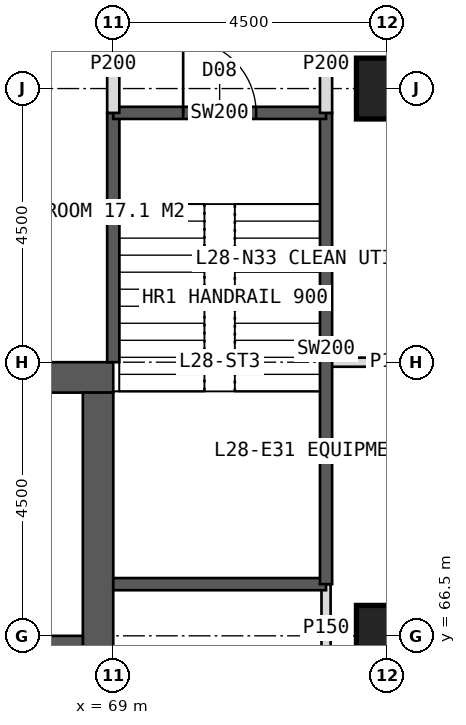
"""IFC4 building model, lengths in metres.
Left out: names, types, materials, properties, quantities, classifications, styles, units other than length and angle.
Written with IfcOpenShell. Run it as: python <this file> out.ifc"""

import sys

from ifc_helpers import new_model, si_unit, direction, frame, frame_2d, origin, origin_2d, place, context, subcontext, project, spatial, rectangle, hollow_rectangle, extrude, element, fill, save


model = new_model("IFC4")
c1 = context("Model", 3, precision=1e-05, world=origin(), true_north=direction((0.0, 1.0)))
c2 = subcontext(c1, "Body", "Model", "MODEL_VIEW")
j1 = project(units=[si_unit("LENGTHUNIT", "METRE"), si_unit("PLANEANGLEUNIT", "RADIAN")], contexts=[c1])
p1 = place(None, origin())
s1 = spatial("IfcSite", under=j1, at=p1, CompositionType="ELEMENT")
p2 = place(p1, origin())
s2 = spatial("IfcBuilding", under=s1, at=p2, CompositionType="ELEMENT")
p3 = place(p2, frame((0.0, 0.0, 120.0)))
s3 = spatial("IfcBuildingStorey", under=s2, at=p3, CompositionType="ELEMENT", Elevation=120.0)
p4 = place(p3, frame((51.0, 70.75, 0.0), z_axis=(0.0, 0.0, 1.0), x_axis=(1.0, 0.0, 0.0)))
e1 = element("IfcWall", 1, at=p4, inside=s3, PredefinedType="SHEAR", context=c2, shape_type="SweptSolid", body=[
    extrude(rectangle(XDim=18.0, YDim=0.5, at=frame_2d((9.0, 0.0))), origin(), (0.0, 0.0, 1.0), 4.0),
])
p5 = place(p4, frame((8.1, 0.0, 0.0)))
e2 = element("IfcOpeningElement", 2, at=p5, cuts=e1, PredefinedType="OPENING", context=c2, shape_type="SweptSolid", body=[
    extrude(rectangle(XDim=1.8, YDim=2.2, at=frame_2d((0.9, 1.1))), frame((0.0, 0.26, 0.0), z_axis=(0.0, -1.0, 0.0), x_axis=(1.0, 0.0, 0.0)), (0.0, 0.0, 1.0), 0.52),
])
p6 = place(p3, frame((68.75, 53.5, 0.0), z_axis=(0.0, 0.0, 1.0), x_axis=(0.0, 1.0, 0.0)))
e3 = element("IfcWall", 3, at=p6, inside=s3, PredefinedType="SHEAR", context=c2, shape_type="SweptSolid", body=[
    extrude(rectangle(XDim=17.0, YDim=0.5, at=frame_2d((8.5, 0.0))), origin(), (0.0, 0.0, 1.0), 4.0),
])
p7 = place(p6, frame((9.5, 0.0, 0.0)))
e4 = element("IfcOpeningElement", 4, at=p7, cuts=e3, PredefinedType="OPENING", context=c2, shape_type="SweptSolid", body=[
    extrude(rectangle(XDim=1.5, YDim=2.2, at=frame_2d((0.75, 1.1))), frame((0.0, 0.26, 0.0), z_axis=(0.0, -1.0, 0.0), x_axis=(1.0, 0.0, 0.0)), (0.0, 0.0, 1.0), 0.52),
])
p8 = place(p3, frame((65.2, 66.35, 0.0), z_axis=(0.0, 0.0, 1.0), x_axis=(1.0, 0.0, 0.0)))
e5 = element("IfcWall", 5, at=p8, inside=s3, PredefinedType="SHEAR", context=c2, shape_type="SweptSolid", body=[
    extrude(rectangle(XDim=3.3, YDim=0.3, at=frame_2d((1.65, 0.0))), origin(), (0.0, 0.0, 1.0), 4.0),
])
p9 = place(p8, frame((1.05, 0.0, 0.0)))
e6 = element("IfcOpeningElement", 6, at=p9, cuts=e5, PredefinedType="OPENING", context=c2, shape_type="SweptSolid", body=[
    extrude(rectangle(XDim=1.2, YDim=2.2, at=frame_2d((0.6, 1.1))), frame((0.0, 0.16, 0.0), z_axis=(0.0, -1.0, 0.0), x_axis=(1.0, 0.0, 0.0)), (0.0, 0.0, 1.0), 0.32),
])
for number, where, z_axis, x_axis in (
    (7, (73.5, 75.5, 0.0), (0.0, 0.0, 1.0), (1.0, 0.0, 0.0)),
    (8, (73.5, 66.5, 0.0), (0.0, 0.0, 1.0), (1.0, 0.0, 0.0)),
):
    element("IfcColumn", number, at=place(p3, frame(where, z_axis=z_axis, x_axis=x_axis)), inside=s3, PredefinedType="COLUMN", context=c2, shape_type="SweptSolid", body=[
        extrude(hollow_rectangle(XDim=1.0, YDim=1.0, WallThickness=0.1, at=origin_2d()), origin(), (0.0, 0.0, 1.0), 4.0),
    ])
p10 = place(p3, frame((72.5, 71.0, 0.0), z_axis=(0.0, 0.0, 1.0), x_axis=(1.0, 0.0, 0.0)))
e9 = element("IfcWall", 9, at=p10, inside=s3, PredefinedType="PARTITIONING", context=c2, shape_type="SweptSolid", body=[
    extrude(rectangle(XDim=2.2, YDim=0.15, at=frame_2d((1.1, 0.0))), origin(), (0.0, 0.0, 1.0), 3.75),
])
p11 = place(p3, frame((72.5, 65.9, 0.0), z_axis=(0.0, 0.0, 1.0), x_axis=(0.0, 1.0, 0.0)))
e10 = element("IfcWall", 10, at=p11, inside=s3, PredefinedType="PARTITIONING", context=c2, shape_type="SweptSolid", body=[
    extrude(rectangle(XDim=1.45, YDim=0.15, at=frame_2d((0.725, 0.0))), origin(), (0.0, 0.0, 1.0), 3.75),
])
p12 = place(p3, frame((69.0, 71.0, 0.0), z_axis=(0.0, 0.0, 1.0), x_axis=(0.0, 1.0, 0.0)))
e11 = element("IfcWall", 11, at=p12, inside=s3, PredefinedType="SOLIDWALL", context=c2, shape_type="SweptSolid", body=[
    extrude(rectangle(XDim=4.1, YDim=0.2, at=frame_2d((2.05, 0.0))), origin(), (0.0, 0.0, 1.0), 3.75),
])
p13 = place(p3, frame((69.0, 67.35, 0.0), z_axis=(0.0, 0.0, 1.0), x_axis=(1.0, 0.0, 0.0)))
e12 = element("IfcWall", 12, at=p13, inside=s3, PredefinedType="SOLIDWALL", context=c2, shape_type="SweptSolid", body=[
    extrude(rectangle(XDim=3.5, YDim=0.2, at=frame_2d((1.75, 0.0))), origin(), (0.0, 0.0, 1.0), 3.75),
])
p14 = place(p3, frame((72.5, 67.35, 0.0), z_axis=(0.0, 0.0, 1.0), x_axis=(0.0, 1.0, 0.0)))
e13 = element("IfcWall", 13, at=p14, inside=s3, PredefinedType="SOLIDWALL", context=c2, shape_type="SweptSolid", body=[
    extrude(rectangle(XDim=7.75, YDim=0.2, at=frame_2d((3.875, 0.0))), origin(), (0.0, 0.0, 1.0), 3.75),
])
p15 = place(p3, frame((69.0, 75.1, 0.0), z_axis=(0.0, 0.0, 1.0), x_axis=(1.0, 0.0, 0.0)))
e14 = element("IfcWall", 14, at=p15, inside=s3, PredefinedType="SOLIDWALL", context=c2, shape_type="SweptSolid", body=[
    extrude(rectangle(XDim=3.5, YDim=0.2, at=frame_2d((1.75, 0.0))), origin(), (0.0, 0.0, 1.0), 3.75),
])
p16 = place(p15, frame((1.15, 0.0, 0.0)))
e15 = element("IfcOpeningElement", 15, at=p16, cuts=e14, PredefinedType="OPENING", context=c2, shape_type="SweptSolid", body=[
    extrude(rectangle(XDim=1.2, YDim=2.1, at=frame_2d((0.6, 1.05))), frame((0.0, 0.11, 0.0), z_axis=(0.0, -1.0, 0.0), x_axis=(1.0, 0.0, 0.0)), (0.0, 0.0, 1.0), 0.22),
])
for number, where, z_axis, x_axis in (
    (16, (69.0, 75.1, 0.0), (0.0, 0.0, 1.0), (0.0, 1.0, 0.0)),
    (17, (72.5, 75.1, 0.0), (0.0, 0.0, 1.0), (0.0, 1.0, 0.0)),
):
    element("IfcWall", number, at=place(p3, frame(where, z_axis=z_axis, x_axis=x_axis)), inside=s3, PredefinedType="PARTITIONING", context=c2, shape_type="SweptSolid", body=[
        extrude(rectangle(XDim=1.6, YDim=0.2, at=frame_2d((0.8, 0.0))), origin(), (0.0, 0.0, 1.0), 3.75),
    ])
p17 = place(p16, origin())
e18 = element("IfcDoor", 18, at=p17, inside=s3, OperationType="SINGLE_SWING_LEFT", PredefinedType="DOOR", context=c2, shape_type="SweptSolid", body=[
    extrude(rectangle(XDim=1.2, YDim=2.1, at=frame_2d((0.6, 1.05))), frame((0.0, 0.025, 0.0), z_axis=(0.0, -1.0, 0.0), x_axis=(1.0, 0.0, 0.0)), (0.0, 0.0, 1.0), 0.05),
])
fill(e15, e18)
save(model, sys.argv[1])
